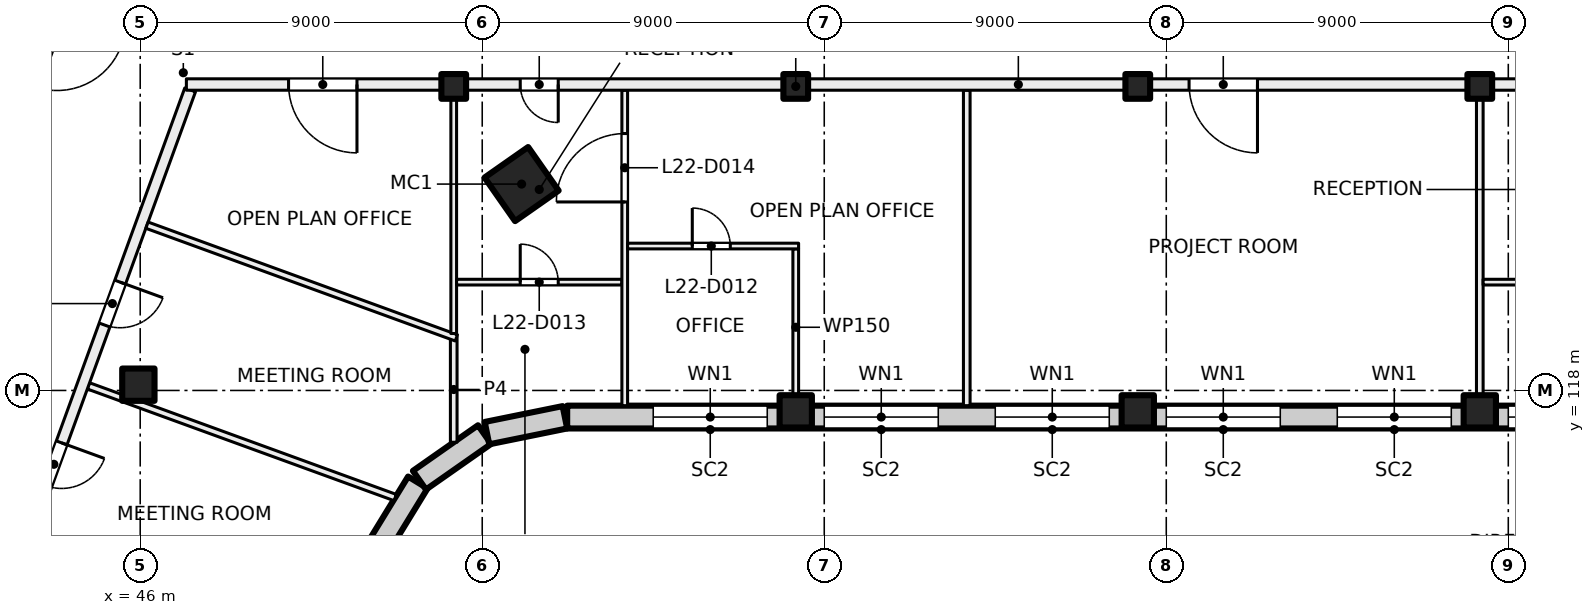
"""IFC4 building model, lengths in metres.
Left out: names, types, materials, properties, quantities, classifications, styles, units other than length and angle.
Written with IfcOpenShell. Run it as: python <this file> out.ifc"""

import sys

from ifc_helpers import new_model, si_unit, direction, frame, frame_2d, origin, origin_2d, place, context, subcontext, project, spatial, rectangle, hollow_rectangle, extrude, element, fill, save


model = new_model("IFC4")
c1 = context("Model", 3, precision=1e-05, world=origin(), true_north=direction((0.0, 1.0)))
c2 = subcontext(c1, "Body", "Model", "MODEL_VIEW")
j1 = project(units=[si_unit("LENGTHUNIT", "METRE"), si_unit("PLANEANGLEUNIT", "RADIAN")], contexts=[c1])
p1 = place(None, origin())
s1 = spatial("IfcSite", under=j1, at=p1, CompositionType="ELEMENT")
p2 = place(p1, origin())
s2 = spatial("IfcBuilding", under=s1, at=p2, CompositionType="ELEMENT")
p3 = place(p2, frame((0.0, 0.0, 97.0)))
s3 = spatial("IfcBuildingStorey", under=s2, at=p3, CompositionType="ELEMENT", Elevation=97.0)
p4 = place(p3, frame((56.036, 123.43, 0.0), z_axis=(0.0, 0.0, 1.0), x_axis=(0.573576436351, -0.819152044289, 0.0)))
e1 = element("IfcColumn", 1, at=p4, inside=s3, PredefinedType="COLUMN", context=c2, shape_type="SweptSolid", body=[
    extrude(hollow_rectangle(XDim=1.4, YDim=1.4, WallThickness=0.04, at=origin_2d()), origin(), (0.0, 0.0, 1.0), 4.0),
])
for number, where, z_axis, x_axis in (
    (2, (54.25, 126.0, 0.0), (0.0, 0.0, 1.0), (1.0, 0.0, 0.0)),
    (3, (63.25, 126.0, 0.0), (0.0, 0.0, 1.0), (1.0, 0.0, 0.0)),
    (4, (72.25, 126.0, 0.0), (0.0, 0.0, 1.0), (1.0, 0.0, 0.0)),
    (5, (81.25, 126.0, 0.0), (0.0, 0.0, 1.0), (1.0, 0.0, 0.0)),
):
    element("IfcColumn", number, at=place(p3, frame(where, z_axis=z_axis, x_axis=x_axis)), inside=s3, PredefinedType="COLUMN", context=c2, shape_type="SweptSolid", body=[
        extrude(rectangle(XDim=0.65, YDim=0.65, at=origin_2d()), origin(), (0.0, 0.0, 1.0), 4.0),
    ])
for number, where, z_axis, x_axis in (
    (6, (45.952, 118.152, 0.0), (0.0, 0.0, 1.0), (1.0, 0.0, 0.0)),
    (7, (63.25, 117.45, 0.0), (0.0, 0.0, 1.0), (1.0, 0.0, 0.0)),
    (8, (72.25, 117.45, 0.0), (0.0, 0.0, 1.0), (1.0, 0.0, 0.0)),
    (9, (81.25, 117.45, 0.0), (0.0, 0.0, 1.0), (1.0, 0.0, 0.0)),
):
    element("IfcColumn", number, at=place(p3, frame(where, z_axis=z_axis, x_axis=x_axis)), inside=s3, PredefinedType="COLUMN", context=c2, shape_type="SweptSolid", body=[
        extrude(rectangle(XDim=0.85, YDim=0.85, at=origin_2d()), origin(), (0.0, 0.0, 1.0), 4.0),
    ])
p5 = place(p3, frame((53.305, 115.578, 0.0), z_axis=(0.0, 0.0, 1.0), x_axis=(-0.522402266438, -0.852699168535, 0.0)))
e10 = element("IfcWall", 10, at=p5, inside=s3, PredefinedType="SOLIDWALL", context=c2, shape_type="SweptSolid", body=[
    extrude(rectangle(XDim=2.042, YDim=0.6, at=frame_2d((1.021, 0.0))), origin(), (0.0, 0.0, 1.0), 3.625),
])
for number, where, z_axis, x_axis in (
    (11, (55.062, 116.839, 0.0), (0.0, 0.0, 1.0), (-0.819, -0.574, 0.0)),
    (12, (57.175, 117.294, 0.0), (0.0, 0.0, 1.0), (-0.98, -0.199, 0.0)),
):
    element("IfcWall", number, at=place(p3, frame(where, z_axis=z_axis, x_axis=x_axis)), inside=s3, PredefinedType="SOLIDWALL", context=c2, shape_type="SweptSolid", body=[
        extrude(rectangle(XDim=2.092, YDim=0.6, at=frame_2d((1.046, 0.0))), origin(), (0.0, 0.0, 1.0), 3.625),
    ])
p6 = place(p3, frame((90.98, 117.3, 0.0), z_axis=(0.0, 0.0, 1.0), x_axis=(-1.0, 0.0, 0.0)))
e13 = element("IfcWall", 13, at=p6, inside=s3, PredefinedType="SOLIDWALL", context=c2, shape_type="SweptSolid", body=[
    extrude(rectangle(XDim=33.745, YDim=0.6, at=frame_2d((16.873, 0.0))), origin(), (0.0, 0.0, 1.0), 3.625),
])
p7 = place(p6, frame((1.48, 0.0, 0.9)))
e14 = element("IfcOpeningElement", 14, at=p7, cuts=e13, PredefinedType="OPENING", context=c2, shape_type="SweptSolid", body=[
    extrude(rectangle(XDim=3.0, YDim=2.4, at=frame_2d((1.5, 1.2))), frame((0.0, 0.31, 0.0), z_axis=(0.0, -1.0, 0.0), x_axis=(1.0, 0.0, 0.0)), (0.0, 0.0, 1.0), 0.62),
])
p8 = place(p6, frame((5.98, 0.0, 0.9)))
e15 = element("IfcOpeningElement", 15, at=p8, cuts=e13, PredefinedType="OPENING", context=c2, shape_type="SweptSolid", body=[
    extrude(rectangle(XDim=3.0, YDim=2.4, at=frame_2d((1.5, 1.2))), frame((0.0, 0.31, 0.0), z_axis=(0.0, -1.0, 0.0), x_axis=(1.0, 0.0, 0.0)), (0.0, 0.0, 1.0), 0.62),
])
p9 = place(p6, frame((10.48, 0.0, 0.9)))
e16 = element("IfcOpeningElement", 16, at=p9, cuts=e13, PredefinedType="OPENING", context=c2, shape_type="SweptSolid", body=[
    extrude(rectangle(XDim=3.0, YDim=2.4, at=frame_2d((1.5, 1.2))), frame((0.0, 0.31, 0.0), z_axis=(0.0, -1.0, 0.0), x_axis=(1.0, 0.0, 0.0)), (0.0, 0.0, 1.0), 0.62),
])
p10 = place(p6, frame((14.98, 0.0, 0.9)))
e17 = element("IfcOpeningElement", 17, at=p10, cuts=e13, PredefinedType="OPENING", context=c2, shape_type="SweptSolid", body=[
    extrude(rectangle(XDim=3.0, YDim=2.4, at=frame_2d((1.5, 1.2))), frame((0.0, 0.31, 0.0), z_axis=(0.0, -1.0, 0.0), x_axis=(1.0, 0.0, 0.0)), (0.0, 0.0, 1.0), 0.62),
])
p11 = place(p6, frame((19.48, 0.0, 0.9)))
e18 = element("IfcOpeningElement", 18, at=p11, cuts=e13, PredefinedType="OPENING", context=c2, shape_type="SweptSolid", body=[
    extrude(rectangle(XDim=3.0, YDim=2.4, at=frame_2d((1.5, 1.2))), frame((0.0, 0.31, 0.0), z_axis=(0.0, -1.0, 0.0), x_axis=(1.0, 0.0, 0.0)), (0.0, 0.0, 1.0), 0.62),
])
p12 = place(p6, frame((23.98, 0.0, 0.9)))
e19 = element("IfcOpeningElement", 19, at=p12, cuts=e13, PredefinedType="OPENING", context=c2, shape_type="SweptSolid", body=[
    extrude(rectangle(XDim=3.0, YDim=2.4, at=frame_2d((1.5, 1.2))), frame((0.0, 0.31, 0.0), z_axis=(0.0, -1.0, 0.0), x_axis=(1.0, 0.0, 0.0)), (0.0, 0.0, 1.0), 0.62),
])
p13 = place(p6, frame((28.48, 0.0, 0.9)))
e20 = element("IfcOpeningElement", 20, at=p13, cuts=e13, PredefinedType="OPENING", context=c2, shape_type="SweptSolid", body=[
    extrude(rectangle(XDim=3.0, YDim=2.4, at=frame_2d((1.5, 1.2))), frame((0.0, 0.31, 0.0), z_axis=(0.0, -1.0, 0.0), x_axis=(1.0, 0.0, 0.0)), (0.0, 0.0, 1.0), 0.62),
])
p14 = place(p3, frame((44.686, 130.091, 0.0), z_axis=(0.0, 0.0, 1.0), x_axis=(-0.342017360004, -0.939693633828, 0.0)))
e21 = element("IfcWall", 21, at=p14, inside=s3, PredefinedType="PARTITIONING", context=c2, shape_type="SweptSolid", body=[
    extrude(rectangle(XDim=34.516, YDim=0.3, at=frame_2d((17.258, 0.0))), origin(), (0.0, 0.0, 1.0), 3.625),
])
p15 = place(p14, frame((27.515, 0.0, 0.0)))
e22 = element("IfcOpeningElement", 22, at=p15, cuts=e21, PredefinedType="OPENING", context=c2, shape_type="SweptSolid", body=[
    extrude(rectangle(XDim=1.0, YDim=2.1, at=frame_2d((0.5, 1.05))), frame((0.0, 0.16, 0.0), z_axis=(0.0, -1.0, 0.0), x_axis=(1.0, 0.0, 0.0)), (0.0, 0.0, 1.0), 0.32),
])
p16 = place(p14, frame((16.865, 0.0, 0.0)))
e23 = element("IfcOpeningElement", 23, at=p16, cuts=e21, PredefinedType="OPENING", context=c2, shape_type="SweptSolid", body=[
    extrude(rectangle(XDim=1.8, YDim=2.1, at=frame_2d((0.9, 1.05))), frame((0.0, 0.16, 0.0), z_axis=(0.0, -1.0, 0.0), x_axis=(1.0, 0.0, 0.0)), (0.0, 0.0, 1.0), 0.32),
])
p17 = place(p14, frame((2.554, 0.0, 0.0)))
e24 = element("IfcOpeningElement", 24, at=p17, cuts=e21, PredefinedType="OPENING", context=c2, shape_type="SweptSolid", body=[
    extrude(rectangle(XDim=1.8, YDim=2.1, at=frame_2d((0.9, 1.05))), frame((0.0, 0.16, 0.0), z_axis=(0.0, -1.0, 0.0), x_axis=(1.0, 0.0, 0.0)), (0.0, 0.0, 1.0), 0.32),
])
p18 = place(p3, frame((44.639, 118.12, 0.0), z_axis=(0.0, 0.0, 1.0), x_axis=(0.939669707102, -0.342083091593, 0.0)))
e25 = element("IfcWall", 25, at=p18, inside=s3, PredefinedType="PARTITIONING", context=c2, shape_type="SweptSolid", body=[
    extrude(rectangle(XDim=8.589, YDim=0.175, at=frame_2d((4.295, 0.0))), origin(), (0.0, 0.0, 1.0), 3.625),
])
p19 = place(p3, frame((47.314, 125.909, 0.0), z_axis=(0.0, 0.0, 1.0), x_axis=(-0.342010770371, -0.939696032209, 0.0)))
e26 = element("IfcWall", 26, at=p19, inside=s3, PredefinedType="PARTITIONING", context=c2, shape_type="SweptSolid", body=[
    extrude(rectangle(XDim=31.485, YDim=0.3, at=frame_2d((15.742, 0.0))), origin(), (0.0, 0.0, 1.0), 3.625),
])
p20 = place(p19, frame((23.459, 0.0, 0.0)))
e27 = element("IfcOpeningElement", 27, at=p20, cuts=e26, PredefinedType="OPENING", context=c2, shape_type="SweptSolid", body=[
    extrude(rectangle(XDim=1.8, YDim=2.1, at=frame_2d((0.9, 1.05))), frame((0.0, 0.16, 0.0), z_axis=(0.0, -1.0, 0.0), x_axis=(1.0, 0.0, 0.0)), (0.0, 0.0, 1.0), 0.32),
])
p21 = place(p19, frame((14.385, 0.0, 0.0)))
e28 = element("IfcOpeningElement", 28, at=p21, cuts=e26, PredefinedType="OPENING", context=c2, shape_type="SweptSolid", body=[
    extrude(rectangle(XDim=1.2, YDim=2.1, at=frame_2d((0.6, 1.05))), frame((0.0, 0.16, 0.0), z_axis=(0.0, -1.0, 0.0), x_axis=(1.0, 0.0, 0.0)), (0.0, 0.0, 1.0), 0.32),
])
p22 = place(p19, frame((9.885, 0.0, 0.0)))
e29 = element("IfcOpeningElement", 29, at=p22, cuts=e26, PredefinedType="OPENING", context=c2, shape_type="SweptSolid", body=[
    extrude(rectangle(XDim=1.2, YDim=2.1, at=frame_2d((0.6, 1.05))), frame((0.0, 0.16, 0.0), z_axis=(0.0, -1.0, 0.0), x_axis=(1.0, 0.0, 0.0)), (0.0, 0.0, 1.0), 0.32),
])
p23 = place(p19, frame((5.384, 0.0, 0.0)))
e30 = element("IfcOpeningElement", 30, at=p23, cuts=e26, PredefinedType="OPENING", context=c2, shape_type="SweptSolid", body=[
    extrude(rectangle(XDim=1.2, YDim=2.1, at=frame_2d((0.6, 1.05))), frame((0.0, 0.16, 0.0), z_axis=(0.0, -1.0, 0.0), x_axis=(1.0, 0.0, 0.0)), (0.0, 0.0, 1.0), 0.32),
])
p24 = place(p3, frame((54.25, 116.637, 0.0), z_axis=(0.0, 0.0, 1.0), x_axis=(0.0, 1.0, 0.0)))
e31 = element("IfcWall", 31, at=p24, inside=s3, PredefinedType="PARTITIONING", context=c2, shape_type="SweptSolid", body=[
    extrude(rectangle(XDim=2.776, YDim=0.175, at=frame_2d((1.388, 0.0))), origin(), (0.0, 0.0, 1.0), 3.625),
])
p25 = place(p3, frame((54.32, 119.384, 0.0), z_axis=(0.0, 0.0, 1.0), x_axis=(-0.939632908118, 0.342184157994, 0.0)))
e32 = element("IfcWall", 32, at=p25, inside=s3, PredefinedType="PARTITIONING", context=c2, shape_type="SweptSolid", body=[
    extrude(rectangle(XDim=8.665, YDim=0.175, at=frame_2d((4.333, 0.0))), origin(), (0.0, 0.0, 1.0), 3.625),
])
p26 = place(p3, frame((54.25, 119.498, 0.0), z_axis=(0.0, 0.0, 1.0), x_axis=(0.0, 1.0, 0.0)))
e33 = element("IfcWall", 33, at=p26, inside=s3, PredefinedType="PARTITIONING", context=c2, shape_type="SweptSolid", body=[
    extrude(rectangle(XDim=6.402, YDim=0.15, at=frame_2d((3.201, 0.0))), origin(), (0.0, 0.0, 1.0), 3.625),
])
p27 = place(p3, frame((54.325, 120.85, 0.0), z_axis=(0.0, 0.0, 1.0), x_axis=(1.0, 0.0, 0.0)))
e34 = element("IfcWall", 34, at=p27, inside=s3, PredefinedType="PARTITIONING", context=c2, shape_type="SweptSolid", body=[
    extrude(rectangle(XDim=4.35, YDim=0.15, at=frame_2d((2.175, 0.0))), origin(), (0.0, 0.0, 1.0), 3.625),
])
p28 = place(p27, frame((1.675, 0.0, 0.0)))
e35 = element("IfcOpeningElement", 35, at=p28, cuts=e34, PredefinedType="OPENING", context=c2, shape_type="SweptSolid", body=[
    extrude(rectangle(XDim=1.0, YDim=2.1, at=frame_2d((0.5, 1.05))), frame((0.0, 0.085, 0.0), z_axis=(0.0, -1.0, 0.0), x_axis=(1.0, 0.0, 0.0)), (0.0, 0.0, 1.0), 0.17),
])
p29 = place(p3, frame((58.75, 117.6, 0.0), z_axis=(0.0, 0.0, 1.0), x_axis=(0.0, 1.0, 0.0)))
e36 = element("IfcWall", 36, at=p29, inside=s3, PredefinedType="PARTITIONING", context=c2, shape_type="SweptSolid", body=[
    extrude(rectangle(XDim=8.3, YDim=0.15, at=frame_2d((4.15, 0.0))), origin(), (0.0, 0.0, 1.0), 3.625),
])
p30 = place(p29, frame((5.36, 0.0, 0.0)))
e37 = element("IfcOpeningElement", 37, at=p30, cuts=e36, PredefinedType="OPENING", context=c2, shape_type="SweptSolid", body=[
    extrude(rectangle(XDim=1.8, YDim=2.1, at=frame_2d((0.9, 1.05))), frame((0.0, 0.085, 0.0), z_axis=(0.0, -1.0, 0.0), x_axis=(1.0, 0.0, 0.0)), (0.0, 0.0, 1.0), 0.17),
])
p31 = place(p3, frame((63.25, 117.6, 0.0), z_axis=(0.0, 0.0, 1.0), x_axis=(0.0, 1.0, 0.0)))
e38 = element("IfcWall", 38, at=p31, inside=s3, PredefinedType="PARTITIONING", context=c2, shape_type="SweptSolid", body=[
    extrude(rectangle(XDim=4.125, YDim=0.15, at=frame_2d((2.062, 0.0))), origin(), (0.0, 0.0, 1.0), 3.625),
])
p32 = place(p3, frame((58.825, 121.8, 0.0), z_axis=(0.0, 0.0, 1.0), x_axis=(1.0, 0.0, 0.0)))
e39 = element("IfcWall", 39, at=p32, inside=s3, PredefinedType="PARTITIONING", context=c2, shape_type="SweptSolid", body=[
    extrude(rectangle(XDim=4.5, YDim=0.15, at=frame_2d((2.25, 0.0))), origin(), (0.0, 0.0, 1.0), 3.625),
])
p33 = place(p32, frame((1.702, 0.0, 0.0)))
e40 = element("IfcOpeningElement", 40, at=p33, cuts=e39, PredefinedType="OPENING", context=c2, shape_type="SweptSolid", body=[
    extrude(rectangle(XDim=1.0, YDim=2.1, at=frame_2d((0.5, 1.05))), frame((0.0, 0.085, 0.0), z_axis=(0.0, -1.0, 0.0), x_axis=(1.0, 0.0, 0.0)), (0.0, 0.0, 1.0), 0.17),
])
for number, where, z_axis, x_axis in (
    (41, (67.75, 117.6, 0.0), (0.0, 0.0, 1.0), (0.0, 1.0, 0.0)),
    (42, (81.25, 117.6, 0.0), (0.0, 0.0, 1.0), (0.0, 1.0, 0.0)),
):
    element("IfcWall", number, at=place(p3, frame(where, z_axis=z_axis, x_axis=x_axis)), inside=s3, PredefinedType="PARTITIONING", context=c2, shape_type="SweptSolid", body=[
        extrude(rectangle(XDim=8.3, YDim=0.175, at=frame_2d((4.15, 0.0))), origin(), (0.0, 0.0, 1.0), 3.625),
    ])
p34 = place(p3, frame((81.338, 120.85, 0.0), z_axis=(0.0, 0.0, 1.0), x_axis=(1.0, 0.0, 0.0)))
e43 = element("IfcWall", 43, at=p34, inside=s3, PredefinedType="PARTITIONING", context=c2, shape_type="SweptSolid", body=[
    extrude(rectangle(XDim=4.337, YDim=0.15, at=frame_2d((2.168, 0.0))), origin(), (0.0, 0.0, 1.0), 3.625),
])
p35 = place(p3, frame((91.0, 126.05, 0.0), z_axis=(0.0, 0.0, 1.0), x_axis=(-1.0, 0.0, 0.0)))
e44 = element("IfcWall", 44, at=p35, inside=s3, PredefinedType="PARTITIONING", context=c2, shape_type="SweptSolid", body=[
    extrude(rectangle(XDim=43.785, YDim=0.3, at=frame_2d((21.893, 0.0))), origin(), (0.0, 0.0, 1.0), 3.625),
])
p36 = place(p35, frame((7.0, 0.0, 0.0)))
e45 = element("IfcOpeningElement", 45, at=p36, cuts=e44, PredefinedType="OPENING", context=c2, shape_type="SweptSolid", body=[
    extrude(rectangle(XDim=1.0, YDim=2.1, at=frame_2d((0.5, 1.05))), frame((0.0, 0.16, 0.0), z_axis=(0.0, -1.0, 0.0), x_axis=(1.0, 0.0, 0.0)), (0.0, 0.0, 1.0), 0.32),
])
p37 = place(p35, frame((15.6, 0.0, 0.0)))
e46 = element("IfcOpeningElement", 46, at=p37, cuts=e44, PredefinedType="OPENING", context=c2, shape_type="SweptSolid", body=[
    extrude(rectangle(XDim=1.8, YDim=2.1, at=frame_2d((0.9, 1.05))), frame((0.0, 0.16, 0.0), z_axis=(0.0, -1.0, 0.0), x_axis=(1.0, 0.0, 0.0)), (0.0, 0.0, 1.0), 0.32),
])
p38 = place(p35, frame((34.0, 0.0, 0.0)))
e47 = element("IfcOpeningElement", 47, at=p38, cuts=e44, PredefinedType="OPENING", context=c2, shape_type="SweptSolid", body=[
    extrude(rectangle(XDim=1.0, YDim=2.1, at=frame_2d((0.5, 1.05))), frame((0.0, 0.16, 0.0), z_axis=(0.0, -1.0, 0.0), x_axis=(1.0, 0.0, 0.0)), (0.0, 0.0, 1.0), 0.32),
])
p39 = place(p35, frame((39.296, 0.0, 0.0)))
e48 = element("IfcOpeningElement", 48, at=p39, cuts=e44, PredefinedType="OPENING", context=c2, shape_type="SweptSolid", body=[
    extrude(rectangle(XDim=1.8, YDim=2.1, at=frame_2d((0.9, 1.05))), frame((0.0, 0.16, 0.0), z_axis=(0.0, -1.0, 0.0), x_axis=(1.0, 0.0, 0.0)), (0.0, 0.0, 1.0), 0.32),
])
p40 = place(p8, origin())
e49 = element("IfcWindow", 49, at=p40, inside=s3, PartitioningType="SINGLE_PANEL", PredefinedType="WINDOW", context=c2, shape_type="SweptSolid", body=[
    extrude(rectangle(XDim=3.0, YDim=2.4, at=frame_2d((1.5, 1.2))), frame((0.0, 0.03, 0.0), z_axis=(0.0, -1.0, 0.0), x_axis=(1.0, 0.0, 0.0)), (0.0, 0.0, 1.0), 0.06),
])
fill(e15, e49)
p41 = place(p9, origin())
e50 = element("IfcWindow", 50, at=p41, inside=s3, PartitioningType="SINGLE_PANEL", PredefinedType="WINDOW", context=c2, shape_type="SweptSolid", body=[
    extrude(rectangle(XDim=3.0, YDim=2.4, at=frame_2d((1.5, 1.2))), frame((0.0, 0.03, 0.0), z_axis=(0.0, -1.0, 0.0), x_axis=(1.0, 0.0, 0.0)), (0.0, 0.0, 1.0), 0.06),
])
fill(e16, e50)
p42 = place(p10, origin())
e51 = element("IfcWindow", 51, at=p42, inside=s3, PartitioningType="SINGLE_PANEL", PredefinedType="WINDOW", context=c2, shape_type="SweptSolid", body=[
    extrude(rectangle(XDim=3.0, YDim=2.4, at=frame_2d((1.5, 1.2))), frame((0.0, 0.03, 0.0), z_axis=(0.0, -1.0, 0.0), x_axis=(1.0, 0.0, 0.0)), (0.0, 0.0, 1.0), 0.06),
])
fill(e17, e51)
p43 = place(p11, origin())
e52 = element("IfcWindow", 52, at=p43, inside=s3, PartitioningType="SINGLE_PANEL", PredefinedType="WINDOW", context=c2, shape_type="SweptSolid", body=[
    extrude(rectangle(XDim=3.0, YDim=2.4, at=frame_2d((1.5, 1.2))), frame((0.0, 0.03, 0.0), z_axis=(0.0, -1.0, 0.0), x_axis=(1.0, 0.0, 0.0)), (0.0, 0.0, 1.0), 0.06),
])
fill(e18, e52)
p44 = place(p12, origin())
e53 = element("IfcWindow", 53, at=p44, inside=s3, PartitioningType="SINGLE_PANEL", PredefinedType="WINDOW", context=c2, shape_type="SweptSolid", body=[
    extrude(rectangle(XDim=3.0, YDim=2.4, at=frame_2d((1.5, 1.2))), frame((0.0, 0.03, 0.0), z_axis=(0.0, -1.0, 0.0), x_axis=(1.0, 0.0, 0.0)), (0.0, 0.0, 1.0), 0.06),
])
fill(e19, e53)
p45 = place(p13, origin())
e54 = element("IfcWindow", 54, at=p45, inside=s3, PartitioningType="SINGLE_PANEL", PredefinedType="WINDOW", context=c2, shape_type="SweptSolid", body=[
    extrude(rectangle(XDim=3.0, YDim=2.4, at=frame_2d((1.5, 1.2))), frame((0.0, 0.03, 0.0), z_axis=(0.0, -1.0, 0.0), x_axis=(1.0, 0.0, 0.0)), (0.0, 0.0, 1.0), 0.06),
])
fill(e20, e54)
p46 = place(p37, origin())
e55 = element("IfcDoor", 55, at=p46, inside=s3, OperationType="DOUBLE_DOOR_SINGLE_SWING", PredefinedType="DOOR", context=c2, shape_type="SweptSolid", body=[
    extrude(rectangle(XDim=1.8, YDim=2.1, at=frame_2d((0.9, 1.05))), frame((0.0, 0.025, 0.0), z_axis=(0.0, -1.0, 0.0), x_axis=(1.0, 0.0, 0.0)), (0.0, 0.0, 1.0), 0.05),
])
fill(e46, e55)
p47 = place(p38, origin())
e56 = element("IfcDoor", 56, at=p47, inside=s3, OperationType="SINGLE_SWING_LEFT", PredefinedType="DOOR", context=c2, shape_type="SweptSolid", body=[
    extrude(rectangle(XDim=1.0, YDim=2.1, at=frame_2d((0.5, 1.05))), frame((0.0, 0.025, 0.0), z_axis=(0.0, -1.0, 0.0), x_axis=(1.0, 0.0, 0.0)), (0.0, 0.0, 1.0), 0.05),
])
fill(e47, e56)
p48 = place(p33, origin())
e57 = element("IfcDoor", 57, at=p48, inside=s3, OperationType="SINGLE_SWING_LEFT", PredefinedType="DOOR", context=c2, shape_type="SweptSolid", body=[
    extrude(rectangle(XDim=1.0, YDim=2.1, at=frame_2d((0.5, 1.05))), frame((0.0, 0.025, 0.0), z_axis=(0.0, -1.0, 0.0), x_axis=(1.0, 0.0, 0.0)), (0.0, 0.0, 1.0), 0.05),
])
fill(e40, e57)
p49 = place(p28, origin())
e58 = element("IfcDoor", 58, at=p49, inside=s3, OperationType="SINGLE_SWING_LEFT", PredefinedType="DOOR", context=c2, shape_type="SweptSolid", body=[
    extrude(rectangle(XDim=1.0, YDim=2.1, at=frame_2d((0.5, 1.05))), frame((0.0, 0.025, 0.0), z_axis=(0.0, -1.0, 0.0), x_axis=(1.0, 0.0, 0.0)), (0.0, 0.0, 1.0), 0.05),
])
fill(e35, e58)
p50 = place(p30, origin())
e59 = element("IfcDoor", 59, at=p50, inside=s3, OperationType="DOUBLE_DOOR_SINGLE_SWING", PredefinedType="DOOR", context=c2, shape_type="SweptSolid", body=[
    extrude(rectangle(XDim=1.8, YDim=2.1, at=frame_2d((0.9, 1.05))), frame((0.0, 0.025, 0.0), z_axis=(0.0, -1.0, 0.0), x_axis=(1.0, 0.0, 0.0)), (0.0, 0.0, 1.0), 0.05),
])
fill(e37, e59)
p51 = place(p22, origin())
e60 = element("IfcDoor", 60, at=p51, inside=s3, OperationType="DOUBLE_DOOR_SINGLE_SWING", PredefinedType="DOOR", context=c2, shape_type="SweptSolid", body=[
    extrude(rectangle(XDim=1.2, YDim=2.1, at=frame_2d((0.6, 1.05))), frame((0.0, 0.025, 0.0), z_axis=(0.0, -1.0, 0.0), x_axis=(1.0, 0.0, 0.0)), (0.0, 0.0, 1.0), 0.05),
])
fill(e29, e60)
p52 = place(p23, origin())
e61 = element("IfcDoor", 61, at=p52, inside=s3, OperationType="DOUBLE_DOOR_SINGLE_SWING", PredefinedType="DOOR", context=c2, shape_type="SweptSolid", body=[
    extrude(rectangle(XDim=1.2, YDim=2.1, at=frame_2d((0.6, 1.05))), frame((0.0, 0.025, 0.0), z_axis=(0.0, -1.0, 0.0), x_axis=(1.0, 0.0, 0.0)), (0.0, 0.0, 1.0), 0.05),
])
fill(e30, e61)
p53 = place(p17, origin())
e62 = element("IfcDoor", 62, at=p53, inside=s3, OperationType="DOUBLE_DOOR_SINGLE_SWING", PredefinedType="DOOR", context=c2, shape_type="SweptSolid", body=[
    extrude(rectangle(XDim=1.8, YDim=2.1, at=frame_2d((0.9, 1.05))), frame((0.0, 0.025, 0.0), z_axis=(0.0, -1.0, 0.0), x_axis=(1.0, 0.0, 0.0)), (0.0, 0.0, 1.0), 0.05),
])
fill(e24, e62)
p54 = place(p39, origin())
e63 = element("IfcDoor", 63, at=p54, inside=s3, OperationType="DOUBLE_DOOR_SINGLE_SWING", PredefinedType="DOOR", context=c2, shape_type="SweptSolid", body=[
    extrude(rectangle(XDim=1.8, YDim=2.1, at=frame_2d((0.9, 1.05))), frame((0.0, 0.025, 0.0), z_axis=(0.0, -1.0, 0.0), x_axis=(1.0, 0.0, 0.0)), (0.0, 0.0, 1.0), 0.05),
])
fill(e48, e63)
save(model, sys.argv[1])
